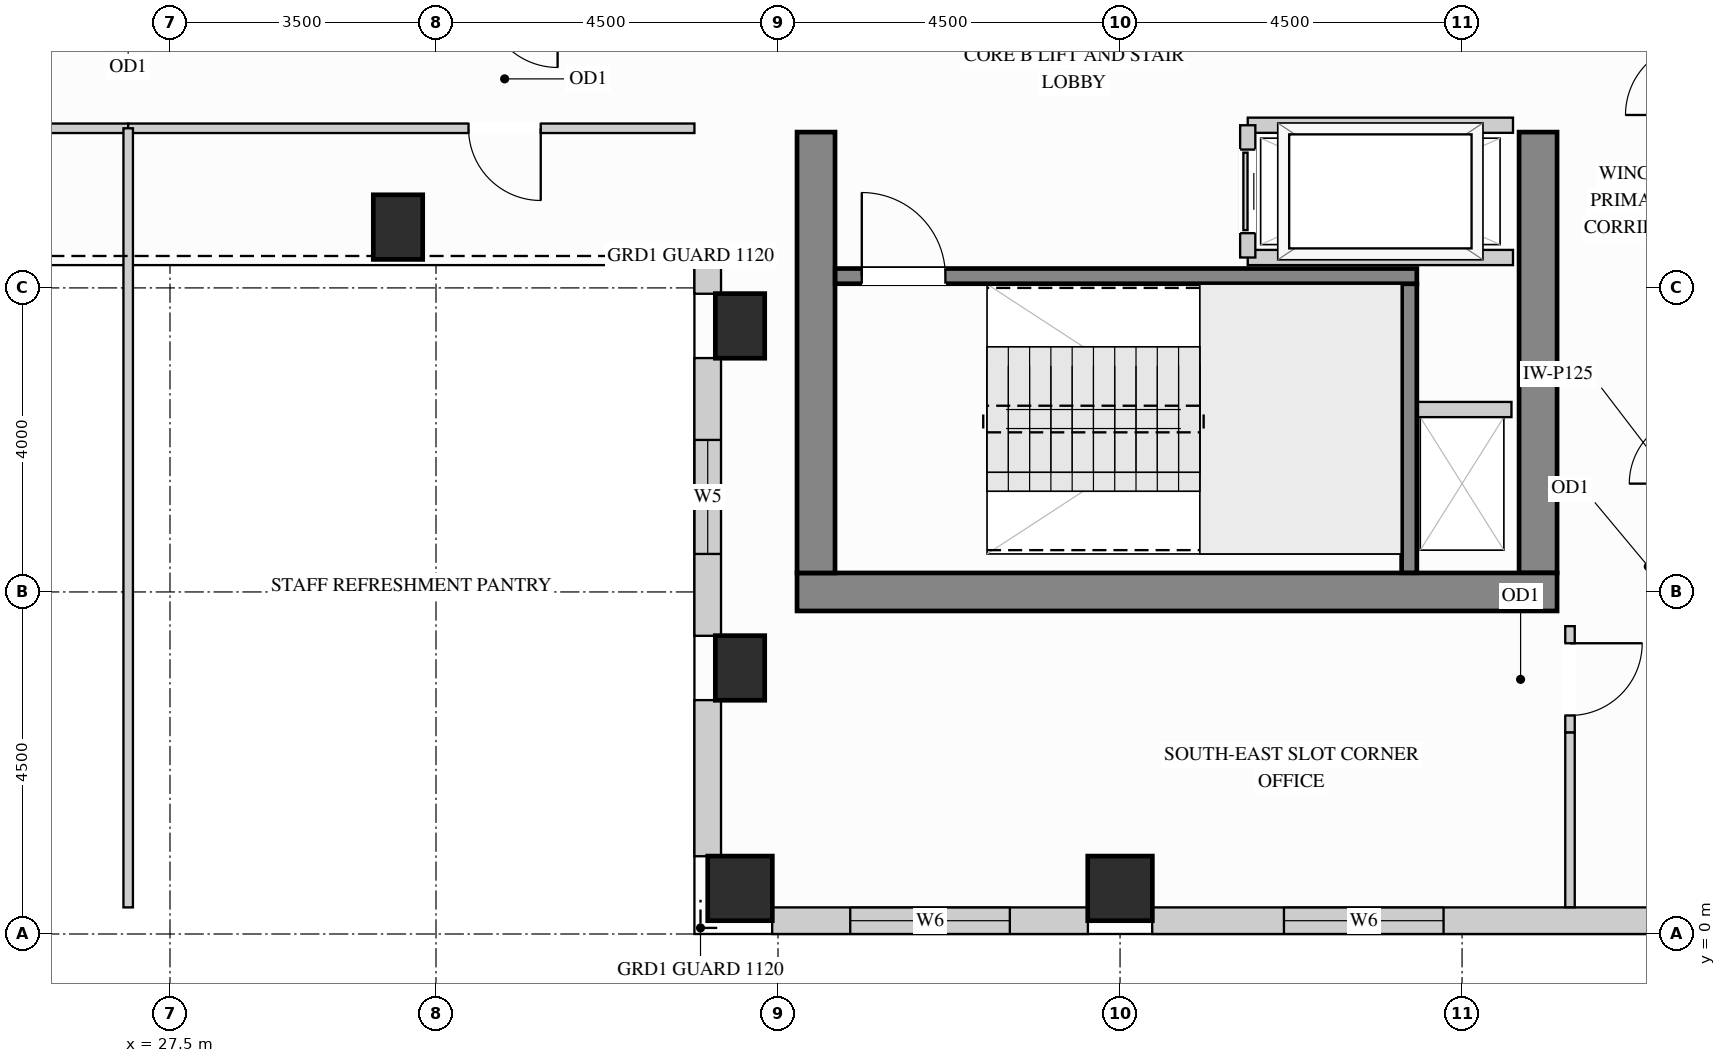
"""IFC4 building model, lengths in metres.
Left out: names, types, materials, properties, quantities, classifications, styles, units other than length and angle.
Written with IfcOpenShell. Run it as: python <this file> out.ifc"""

import sys

from ifc_helpers import new_model, si_unit, direction, frame, frame_2d, origin, origin_2d, place, context, subcontext, project, spatial, rectangle, extrude, source, transform, mapped, element, fill, save


model = new_model("IFC4")
c1 = context("Model", 3, precision=1e-05, world=origin(), true_north=direction((0.0, 1.0)))
c2 = subcontext(c1, "Body", "Model", "MODEL_VIEW")
j1 = project(units=[si_unit("LENGTHUNIT", "METRE"), si_unit("PLANEANGLEUNIT", "RADIAN")], contexts=[c1])
p1 = place(None, origin())
s1 = spatial("IfcSite", under=j1, at=p1, CompositionType="ELEMENT")
p2 = place(p1, origin())
s2 = spatial("IfcBuilding", under=s1, at=p2, CompositionType="ELEMENT")
p3 = place(p2, frame((0.0, 0.0, 248.4)))
s3 = spatial("IfcBuildingStorey", under=s2, at=p3, CompositionType="ELEMENT", Elevation=248.4)
m1 = source(origin(), c2, "Body", "SweptSolid", [
    extrude(rectangle(XDim=0.65, YDim=0.85, at=origin_2d()), origin(), (0.0, 0.0, 1.0), 3.4),
])
for number, where, z_axis, x_axis in (
    (1, (35.0, 3.5, 0.0), (0.0, 0.0, 1.0), (1.0, 0.0, 0.0)),
    (2, (35.0, 8.0, 0.0), (0.0, 0.0, 1.0), (1.0, 0.0, 0.0)),
    (3, (30.5, 9.3, 0.0), (0.0, 0.0, 1.0), (1.0, 0.0, 0.0)),
):
    element("IfcColumn", number, at=place(p3, frame(where, z_axis=z_axis, x_axis=x_axis)), inside=s3, PredefinedType="COLUMN", context=c2, shape_type="MappedRepresentation", body=[
        mapped(m1, transform((0.0, 0.0, 0.0), x_axis=(1.0, 0.0, 0.0), y_axis=(0.0, 1.0, 0.0), z_axis=(0.0, 0.0, 1.0))),
    ])
m2 = source(origin(), c2, "Body", "SweptSolid", [
    extrude(rectangle(XDim=0.85, YDim=0.85, at=origin_2d()), origin(), (0.0, 0.0, 1.0), 3.4),
])
for number, where, z_axis, x_axis in (
    (4, (35.0, 0.6, 0.0), (0.0, 0.0, 1.0), (1.0, 0.0, 0.0)),
    (5, (40.0, 0.6, 0.0), (0.0, 0.0, 1.0), (1.0, 0.0, 0.0)),
):
    element("IfcColumn", number, at=place(p3, frame(where, z_axis=z_axis, x_axis=x_axis)), inside=s3, PredefinedType="COLUMN", context=c2, shape_type="MappedRepresentation", body=[
        mapped(m2, transform((0.0, 0.0, 0.0), x_axis=(1.0, 0.0, 0.0), y_axis=(0.0, 1.0, 0.0), z_axis=(0.0, 0.0, 1.0))),
    ])
m3 = source(origin(), c2, "Body", "SweptSolid", [
    extrude(rectangle(XDim=5.8, YDim=0.5, at=frame_2d((2.9, 0.0))), origin(), (0.0, 0.0, 1.0), 3.4),
])
p4 = place(p3, frame((45.5, 4.75, 0.0), z_axis=(0.0, 0.0, 1.0), x_axis=(0.0, 1.0, 0.0)))
e6 = element("IfcWall", 6, at=p4, inside=s3, PredefinedType="SHEAR", context=c2, shape_type="MappedRepresentation", body=[
    mapped(m3, transform((0.0, 0.0, 0.0), x_axis=(1.0, 0.0, 0.0), y_axis=(0.0, 1.0, 0.0), z_axis=(0.0, 0.0, 1.0))),
])
m4 = source(origin(), c2, "Body", "SweptSolid", [
    extrude(rectangle(XDim=10.0, YDim=0.5, at=frame_2d((5.0, 0.0))), origin(), (0.0, 0.0, 1.0), 3.4),
])
p5 = place(p3, frame((35.75, 4.5, 0.0), z_axis=(0.0, 0.0, 1.0), x_axis=(1.0, 0.0, 0.0)))
e7 = element("IfcWall", 7, at=p5, inside=s3, PredefinedType="SHEAR", context=c2, shape_type="MappedRepresentation", body=[
    mapped(m4, transform((0.0, 0.0, 0.0), x_axis=(1.0, 0.0, 0.0), y_axis=(0.0, 1.0, 0.0), z_axis=(0.0, 0.0, 1.0))),
])
p6 = place(p3, frame((36.0, 4.75, 0.0), z_axis=(0.0, 0.0, 1.0), x_axis=(0.0, 1.0, 0.0)))
e8 = element("IfcWall", 8, at=p6, inside=s3, PredefinedType="SHEAR", context=c2, shape_type="MappedRepresentation", body=[
    mapped(m3, transform((0.0, 0.0, 0.0), x_axis=(1.0, 0.0, 0.0), y_axis=(0.0, 1.0, 0.0), z_axis=(0.0, 0.0, 1.0))),
])
m5 = source(origin(), c2, "Body", "SweptSolid", [
    extrude(rectangle(XDim=0.379, YDim=0.35, at=frame_2d((0.189, 0.0))), origin(), (0.0, 0.0, 1.0), 3.385),
])
p7 = place(p3, frame((34.575, 8.802, 0.0), z_axis=(0.0, 0.0, 1.0), x_axis=(0.0, -1.0, 0.0)))
e9 = element("IfcWall", 9, at=p7, inside=s3, PredefinedType="SOLIDWALL", context=c2, shape_type="MappedRepresentation", body=[
    mapped(m5, transform((0.0, 0.0, 0.0), x_axis=(1.0, 0.0, 0.0), y_axis=(0.0, 1.0, 0.0), z_axis=(0.0, 0.0, 1.0))),
])
p8 = place(p3, frame((34.575, 7.577, 0.0), z_axis=(0.0, 0.0, 1.0), x_axis=(0.0, -1.0, 0.0)))
e10 = element("IfcWall", 10, at=p8, inside=s3, PredefinedType="SOLIDWALL", context=c2, shape_type="SweptSolid", body=[
    extrude(rectangle(XDim=3.654, YDim=0.35, at=frame_2d((1.827, 0.0))), origin(), (0.0, 0.0, 1.0), 3.385),
])
p9 = place(p8, frame((1.077, 0.0, 0.78)))
e11 = element("IfcOpeningElement", 11, at=p9, cuts=e10, PredefinedType="OPENING", context=c2, shape_type="SweptSolid", body=[
    extrude(rectangle(XDim=1.5, YDim=2.0, at=frame_2d((0.75, 1.0))), frame((0.0, 0.185, 0.0), z_axis=(0.0, -1.0, 0.0), x_axis=(1.0, 0.0, 0.0)), (0.0, 0.0, 1.0), 0.37),
])
m6 = source(origin(), c2, "Body", "SweptSolid", [
    extrude(rectangle(XDim=2.054, YDim=0.35, at=frame_2d((1.027, 0.0))), origin(), (0.0, 0.0, 1.0), 3.385),
])
p10 = place(p3, frame((34.575, 3.077, 0.0), z_axis=(0.0, 0.0, 1.0), x_axis=(0.0, -1.0, 0.0)))
e12 = element("IfcWall", 12, at=p10, inside=s3, PredefinedType="SOLIDWALL", context=c2, shape_type="MappedRepresentation", body=[
    mapped(m6, transform((0.0, 0.0, 0.0), x_axis=(1.0, 0.0, 0.0), y_axis=(0.0, 1.0, 0.0), z_axis=(0.0, 0.0, 1.0))),
])
p11 = place(p3, frame((35.423, 0.175, 0.0), z_axis=(0.0, 0.0, 1.0), x_axis=(1.0, 0.0, 0.0)))
e13 = element("IfcWall", 13, at=p11, inside=s3, PredefinedType="SOLIDWALL", context=c2, shape_type="SweptSolid", body=[
    extrude(rectangle(XDim=4.154, YDim=0.35, at=frame_2d((2.077, 0.0))), origin(), (0.0, 0.0, 1.0), 3.385),
])
p12 = place(p11, frame((1.027, 0.0, 0.78)))
e14 = element("IfcOpeningElement", 14, at=p12, cuts=e13, PredefinedType="OPENING", context=c2, shape_type="SweptSolid", body=[
    extrude(rectangle(XDim=2.1, YDim=2.25, at=frame_2d((1.05, 1.125))), frame((0.0, 0.185, 0.0), z_axis=(0.0, -1.0, 0.0), x_axis=(1.0, 0.0, 0.0)), (0.0, 0.0, 1.0), 0.37),
])
p13 = place(p3, frame((40.423, 0.175, 0.0), z_axis=(0.0, 0.0, 1.0), x_axis=(1.0, 0.0, 0.0)))
e15 = element("IfcWall", 15, at=p13, inside=s3, PredefinedType="SOLIDWALL", context=c2, shape_type="SweptSolid", body=[
    extrude(rectangle(XDim=7.077, YDim=0.35, at=frame_2d((3.539, 0.0))), origin(), (0.0, 0.0, 1.0), 3.385),
])
p14 = place(p13, frame((1.733, 0.0, 0.78)))
e16 = element("IfcOpeningElement", 16, at=p14, cuts=e15, PredefinedType="OPENING", context=c2, shape_type="SweptSolid", body=[
    extrude(rectangle(XDim=2.1, YDim=2.25, at=frame_2d((1.05, 1.125))), frame((0.0, 0.185, 0.0), z_axis=(0.0, -1.0, 0.0), x_axis=(1.0, 0.0, 0.0)), (0.0, 0.0, 1.0), 0.37),
])
p15 = place(p3, frame((45.92, 2.65, 0.0), z_axis=(0.0, 0.0, 1.0), x_axis=(0.0, 1.0, 0.0)))
e17 = element("IfcWall", 17, at=p15, inside=s3, PredefinedType="PARTITIONING", context=c2, shape_type="SweptSolid", body=[
    extrude(rectangle(XDim=1.4, YDim=0.125, at=frame_2d((0.7, 0.0))), origin(), (0.0, 0.0, 1.0), 3.385),
])
p16 = place(p15, frame((0.225, 0.0, 0.0)))
e18 = element("IfcOpeningElement", 18, at=p16, cuts=e17, PredefinedType="OPENING", context=c2, shape_type="SweptSolid", body=[
    extrude(rectangle(XDim=0.95, YDim=2.15, at=frame_2d((0.475, 1.075))), frame((0.0, 0.073, 0.0), z_axis=(0.0, -1.0, 0.0), x_axis=(1.0, 0.0, 0.0)), (0.0, 0.0, 1.0), 0.145),
])
m7 = source(origin(), c2, "Body", "SweptSolid", [
    extrude(rectangle(XDim=2.298, YDim=0.125, at=frame_2d((1.149, 0.0))), origin(), (0.0, 0.0, 1.0), 3.385),
])
p17 = place(p3, frame((45.92, 0.352, 0.0), z_axis=(0.0, 0.0, 1.0), x_axis=(0.0, 1.0, 0.0)))
e19 = element("IfcWall", 19, at=p17, inside=s3, PredefinedType="PARTITIONING", context=c2, shape_type="MappedRepresentation", body=[
    mapped(m7, transform((0.0, 0.0, 0.0), x_axis=(1.0, 0.0, 0.0), y_axis=(0.0, 1.0, 0.0), z_axis=(0.0, 0.0, 1.0))),
])
p18 = place(p3, frame((19.5, 10.6, 0.0), z_axis=(0.0, 0.0, 1.0), x_axis=(1.0, 0.0, 0.0)))
e20 = element("IfcWall", 20, at=p18, inside=s3, PredefinedType="PARTITIONING", context=c2, shape_type="SweptSolid", body=[
    extrude(rectangle(XDim=7.45, YDim=0.125, at=frame_2d((3.725, 0.0))), origin(), (0.0, 0.0, 1.0), 3.385),
])
p19 = place(p18, frame((2.022, 0.0, 0.0)))
e21 = element("IfcOpeningElement", 21, at=p19, cuts=e20, PredefinedType="OPENING", context=c2, shape_type="SweptSolid", body=[
    extrude(rectangle(XDim=0.95, YDim=2.15, at=frame_2d((0.475, 1.075))), frame((0.0, 0.073, 0.0), z_axis=(0.0, -1.0, 0.0), x_axis=(1.0, 0.0, 0.0)), (0.0, 0.0, 1.0), 0.145),
])
p20 = place(p3, frame((26.95, 10.6, 0.0), z_axis=(0.0, 0.0, 1.0), x_axis=(1.0, 0.0, 0.0)))
e22 = element("IfcWall", 22, at=p20, inside=s3, PredefinedType="PARTITIONING", context=c2, shape_type="SweptSolid", body=[
    extrude(rectangle(XDim=7.45, YDim=0.125, at=frame_2d((3.725, 0.0))), origin(), (0.0, 0.0, 1.0), 3.385),
])
p21 = place(p20, frame((4.478, 0.0, 0.0)))
e23 = element("IfcOpeningElement", 23, at=p21, cuts=e22, PredefinedType="OPENING", context=c2, shape_type="SweptSolid", body=[
    extrude(rectangle(XDim=0.95, YDim=2.15, at=frame_2d((0.475, 1.075))), frame((0.0, 0.073, 0.0), z_axis=(0.0, -1.0, 0.0), x_axis=(1.0, 0.0, 0.0)), (0.0, 0.0, 1.0), 0.145),
])
m8 = source(origin(), c2, "Body", "SweptSolid", [
    extrude(rectangle(XDim=10.25, YDim=0.125, at=frame_2d((5.125, 0.0))), origin(), (0.0, 0.0, 1.0), 3.385),
])
p22 = place(p3, frame((26.95, 0.35, 0.0), z_axis=(0.0, 0.0, 1.0), x_axis=(0.0, 1.0, 0.0)))
e24 = element("IfcWall", 24, at=p22, inside=s3, PredefinedType="PARTITIONING", context=c2, shape_type="MappedRepresentation", body=[
    mapped(m8, transform((0.0, 0.0, 0.0), x_axis=(1.0, 0.0, 0.0), y_axis=(0.0, 1.0, 0.0), z_axis=(0.0, 0.0, 1.0))),
])
m9 = source(origin(), c2, "Body", "SweptSolid", [
    extrude(rectangle(XDim=1.3, YDim=0.2, at=frame_2d((0.65, 0.0))), origin(), (0.0, 0.0, 1.0), 3.385),
])
p23 = place(p3, frame((43.85, 6.9, 0.0), z_axis=(0.0, 0.0, 1.0), x_axis=(1.0, 0.0, 0.0)))
e25 = element("IfcWall", 25, at=p23, inside=s3, PredefinedType="PARTITIONING", context=c2, shape_type="MappedRepresentation", body=[
    mapped(m9, transform((0.0, 0.0, 0.0), x_axis=(1.0, 0.0, 0.0), y_axis=(0.0, 1.0, 0.0), z_axis=(0.0, 0.0, 1.0))),
])
m10 = source(origin(), c2, "Body", "SweptSolid", [
    extrude(rectangle(XDim=3.49, YDim=0.2, at=frame_2d((1.745, 0.0))), origin(), (0.0, 0.0, 1.0), 3.385),
])
for number, where, z_axis, x_axis in (
    (26, (41.68, 10.64, 0.0), (0.0, 0.0, 1.0), (1.0, 0.0, 0.0)),
    (27, (41.68, 8.9, 0.0), (0.0, 0.0, 1.0), (1.0, 0.0, 0.0)),
):
    element("IfcWall", number, at=place(p3, frame(where, z_axis=z_axis, x_axis=x_axis)), inside=s3, PredefinedType="PARTITIONING", context=c2, shape_type="MappedRepresentation", body=[
        mapped(m10, transform((0.0, 0.0, 0.0), x_axis=(1.0, 0.0, 0.0), y_axis=(0.0, 1.0, 0.0), z_axis=(0.0, 0.0, 1.0))),
    ])
p24 = place(p3, frame((41.68, 8.9, 0.0), z_axis=(0.0, 0.0, 1.0), x_axis=(0.0, 1.0, 0.0)))
e28 = element("IfcWall", 28, at=p24, inside=s3, PredefinedType="PARTITIONING", context=c2, shape_type="SweptSolid", body=[
    extrude(rectangle(XDim=1.74, YDim=0.2, at=frame_2d((0.87, 0.0))), origin(), (0.0, 0.0, 1.0), 3.385),
])
p25 = place(p24, frame((0.32, 0.0, 0.0)))
e29 = element("IfcOpeningElement", 29, at=p25, cuts=e28, PredefinedType="OPENING", context=c2, shape_type="SweptSolid", body=[
    extrude(rectangle(XDim=1.1, YDim=2.2, at=frame_2d((0.55, 1.1))), frame((0.0, 0.11, 0.0), z_axis=(0.0, -1.0, 0.0), x_axis=(1.0, 0.0, 0.0)), (0.0, 0.0, 1.0), 0.22),
])
m11 = source(origin(), c2, "Body", "SweptSolid", [
    extrude(rectangle(XDim=3.803, YDim=0.2, at=frame_2d((1.901, 0.0))), origin(), (0.0, 0.0, 1.0), 3.4),
])
p26 = place(p3, frame((43.805, 4.752, 0.0), z_axis=(0.0, 0.0, 1.0), x_axis=(0.0, 1.0, 0.0)))
e30 = element("IfcWall", 30, at=p26, inside=s3, PredefinedType="SHEAR", context=c2, shape_type="MappedRepresentation", body=[
    mapped(m11, transform((0.0, 0.0, 0.0), x_axis=(1.0, 0.0, 0.0), y_axis=(0.0, 1.0, 0.0), z_axis=(0.0, 0.0, 1.0))),
])
p27 = place(p3, frame((36.252, 8.655, 0.0), z_axis=(0.0, 0.0, 1.0), x_axis=(1.0, 0.0, 0.0)))
e31 = element("IfcWall", 31, at=p27, inside=s3, PredefinedType="SHEAR", context=c2, shape_type="SweptSolid", body=[
    extrude(rectangle(XDim=7.653, YDim=0.2, at=frame_2d((3.827, 0.0))), origin(), (0.0, 0.0, 1.0), 3.4),
])
p28 = place(p27, frame((0.35, 0.0, 0.0)))
e32 = element("IfcOpeningElement", 32, at=p28, cuts=e31, PredefinedType="OPENING", context=c2, shape_type="SweptSolid", body=[
    extrude(rectangle(XDim=1.1, YDim=2.15, at=frame_2d((0.55, 1.075))), frame((0.0, 0.11, 0.0), z_axis=(0.0, -1.0, 0.0), x_axis=(1.0, 0.0, 0.0)), (0.0, 0.0, 1.0), 0.22),
])
m12 = source(origin(), c2, "Body", "SweptSolid", [
    extrude(rectangle(XDim=1.1, YDim=2.2, at=frame_2d((0.55, 1.1))), frame((0.0, 0.025, 0.0), z_axis=(0.0, -1.0, 0.0), x_axis=(1.0, 0.0, 0.0)), (0.0, 0.0, 1.0), 0.05),
])
p29 = place(p25, origin())
e33 = element("IfcDoor", 33, at=p29, inside=s3, OperationType="SLIDING_TO_LEFT", PredefinedType="DOOR", context=c2, shape_type="MappedRepresentation", body=[
    mapped(m12, transform((0.0, 0.0, 0.0), x_axis=(1.0, 0.0, 0.0), y_axis=(0.0, 1.0, 0.0), z_axis=(0.0, 0.0, 1.0))),
])
fill(e29, e33)
m13 = source(origin(), c2, "Body", "SweptSolid", [
    extrude(rectangle(XDim=0.95, YDim=2.15, at=frame_2d((0.475, 1.075))), frame((0.0, 0.025, 0.0), z_axis=(0.0, -1.0, 0.0), x_axis=(1.0, 0.0, 0.0)), (0.0, 0.0, 1.0), 0.05),
])
p30 = place(p16, origin())
e34 = element("IfcDoor", 34, at=p30, inside=s3, OperationType="SINGLE_SWING_RIGHT", PredefinedType="DOOR", context=c2, shape_type="MappedRepresentation", body=[
    mapped(m13, transform((0.0, 0.0, 0.0), x_axis=(1.0, 0.0, 0.0), y_axis=(0.0, 1.0, 0.0), z_axis=(0.0, 0.0, 1.0))),
])
fill(e18, e34)
p31 = place(p21, origin())
e35 = element("IfcDoor", 35, at=p31, inside=s3, OperationType="SINGLE_SWING_RIGHT", PredefinedType="DOOR", context=c2, shape_type="MappedRepresentation", body=[
    mapped(m13, transform((0.0, 0.0, 0.0), x_axis=(1.0, 0.0, 0.0), y_axis=(0.0, 1.0, 0.0), z_axis=(0.0, 0.0, 1.0))),
])
fill(e23, e35)
m14 = source(origin(), c2, "Body", "SweptSolid", [
    extrude(rectangle(XDim=1.1, YDim=2.15, at=frame_2d((0.55, 1.075))), frame((0.0, 0.025, 0.0), z_axis=(0.0, -1.0, 0.0), x_axis=(1.0, 0.0, 0.0)), (0.0, 0.0, 1.0), 0.05),
])
p32 = place(p28, origin())
e36 = element("IfcDoor", 36, at=p32, inside=s3, OperationType="SINGLE_SWING_LEFT", PredefinedType="DOOR", context=c2, shape_type="MappedRepresentation", body=[
    mapped(m14, transform((0.0, 0.0, 0.0), x_axis=(1.0, 0.0, 0.0), y_axis=(0.0, 1.0, 0.0), z_axis=(0.0, 0.0, 1.0))),
])
fill(e32, e36)
m15 = source(origin(), c2, "Body", "SweptSolid", [
    extrude(rectangle(XDim=1.5, YDim=2.0, at=frame_2d((0.75, 1.0))), frame((0.0, 0.03, 0.0), z_axis=(0.0, -1.0, 0.0), x_axis=(1.0, 0.0, 0.0)), (0.0, 0.0, 1.0), 0.06),
])
p33 = place(p9, origin())
e37 = element("IfcWindow", 37, at=p33, inside=s3, PartitioningType="SINGLE_PANEL", PredefinedType="WINDOW", context=c2, shape_type="MappedRepresentation", body=[
    mapped(m15, transform((0.0, 0.0, 0.0), x_axis=(1.0, 0.0, 0.0), y_axis=(0.0, 1.0, 0.0), z_axis=(0.0, 0.0, 1.0))),
])
fill(e11, e37)
m16 = source(origin(), c2, "Body", "SweptSolid", [
    extrude(rectangle(XDim=2.1, YDim=2.25, at=frame_2d((1.05, 1.125))), frame((0.0, 0.03, 0.0), z_axis=(0.0, -1.0, 0.0), x_axis=(1.0, 0.0, 0.0)), (0.0, 0.0, 1.0), 0.06),
])
p34 = place(p12, origin())
e38 = element("IfcWindow", 38, at=p34, inside=s3, PartitioningType="SINGLE_PANEL", PredefinedType="WINDOW", context=c2, shape_type="MappedRepresentation", body=[
    mapped(m16, transform((0.0, 0.0, 0.0), x_axis=(1.0, 0.0, 0.0), y_axis=(0.0, 1.0, 0.0), z_axis=(0.0, 0.0, 1.0))),
])
fill(e14, e38)
p35 = place(p14, origin())
e39 = element("IfcWindow", 39, at=p35, inside=s3, PartitioningType="SINGLE_PANEL", PredefinedType="WINDOW", context=c2, shape_type="MappedRepresentation", body=[
    mapped(m16, transform((0.0, 0.0, 0.0), x_axis=(1.0, 0.0, 0.0), y_axis=(0.0, 1.0, 0.0), z_axis=(0.0, 0.0, 1.0))),
])
fill(e16, e39)
save(model, sys.argv[1])
